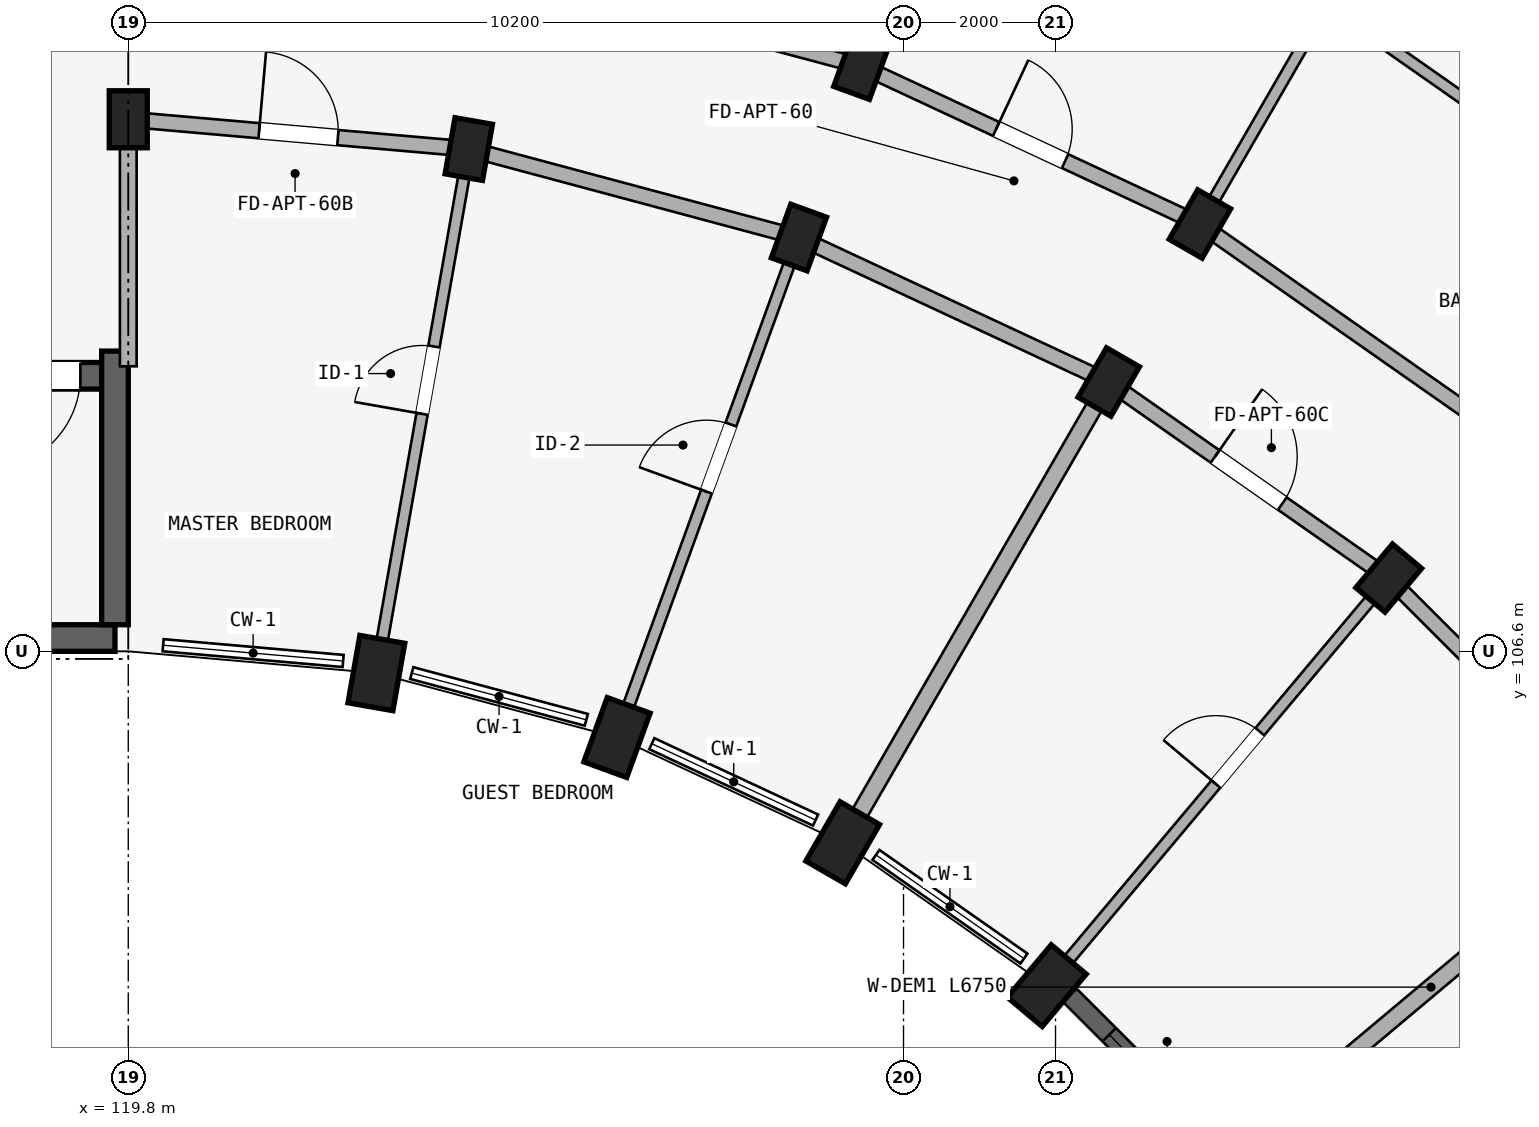
"""IFC4 building model, lengths in metres.
Left out: names, types, materials, properties, quantities, classifications, styles, units other than length and angle.
Written with IfcOpenShell. Run it as: python <this file> out.ifc"""

import sys

from ifc_helpers import new_model, si_unit, direction, frame, frame_2d, origin, origin_2d, place, context, subcontext, project, spatial, rectangle, extrude, element, fill, save


model = new_model("IFC4")
c1 = context("Model", 3, precision=1e-05, world=origin(), true_north=direction((0.0, 1.0)))
c2 = subcontext(c1, "Body", "Model", "MODEL_VIEW")
j1 = project(units=[si_unit("LENGTHUNIT", "METRE"), si_unit("PLANEANGLEUNIT", "RADIAN")], contexts=[c1])
p1 = place(None, origin())
s1 = spatial("IfcSite", under=j1, at=p1, CompositionType="ELEMENT")
p2 = place(p1, origin())
s2 = spatial("IfcBuilding", under=s1, at=p2, CompositionType="ELEMENT")
p3 = place(p2, frame((0.0, 0.0, 4.5)))
s3 = spatial("IfcBuildingStorey", under=s2, at=p3, CompositionType="ELEMENT", Elevation=4.5)
p4 = place(p3, frame((119.625, 106.775, 0.0), z_axis=(0.0, 0.0, 1.0), x_axis=(-1.0, 0.0, 0.0)))
e1 = element("IfcWall", 1, at=p4, inside=s3, PredefinedType="SHEAR", context=c2, shape_type="SweptSolid", body=[
    extrude(rectangle(XDim=8.25, YDim=0.35, at=frame_2d((4.125, 0.0))), origin(), (0.0, 0.0, 1.0), 3.98),
])
p5 = place(p3, frame((119.45, 110.225, 0.0), z_axis=(0.0, 0.0, 1.0), x_axis=(-1.0, 0.0, 0.0)))
e2 = element("IfcWall", 2, at=p5, inside=s3, PredefinedType="SHEAR", context=c2, shape_type="SweptSolid", body=[
    extrude(rectangle(XDim=7.9, YDim=0.35, at=frame_2d((3.95, 0.0))), origin(), (0.0, 0.0, 1.0), 3.98),
])
p6 = place(p5, frame((0.28, 0.0, 0.0)))
e3 = element("IfcOpeningElement", 3, at=p6, cuts=e2, PredefinedType="OPENING", context=c2, shape_type="SweptSolid", body=[
    extrude(rectangle(XDim=1.24, YDim=2.15, at=frame_2d((0.62, 1.075))), frame((0.0, 0.185, 0.0), z_axis=(0.0, -1.0, 0.0), x_axis=(1.0, 0.0, 0.0)), (0.0, 0.0, 1.0), 0.37),
])
p7 = place(p3, frame((119.625, 106.95, 0.0), z_axis=(0.0, 0.0, 1.0), x_axis=(0.0, 1.0, 0.0)))
e4 = element("IfcWall", 4, at=p7, inside=s3, PredefinedType="SHEAR", context=c2, shape_type="SweptSolid", body=[
    extrude(rectangle(XDim=3.6, YDim=0.35, at=frame_2d((1.8, 0.0))), origin(), (0.0, 0.0, 1.0), 3.98),
])
p8 = place(p3, frame((119.8, 113.6, 0.0), z_axis=(0.0, 0.0, 1.0), x_axis=(1.0, 0.0, 0.0)))
e5 = element("IfcColumn", 5, at=p8, inside=s3, PredefinedType="COLUMN", context=c2, shape_type="SweptSolid", body=[
    extrude(rectangle(XDim=0.5, YDim=0.75, at=origin_2d()), origin(), (0.0, 0.0, 1.0), 3.98),
])
p9 = place(p3, frame((123.065, 106.314, 0.0), z_axis=(0.0, 0.0, 1.0), x_axis=(-0.984807753012, 0.173648177667, 0.0)))
e6 = element("IfcColumn", 6, at=p9, inside=s3, PredefinedType="COLUMN", context=c2, shape_type="SweptSolid", body=[
    extrude(rectangle(XDim=0.6, YDim=0.9, at=origin_2d()), origin(), (0.0, 0.0, 1.0), 3.98),
])
p10 = place(p3, frame((124.28, 113.208, 0.0), z_axis=(0.0, 0.0, 1.0), x_axis=(-0.984807753012, 0.173648177667, 0.0)))
e7 = element("IfcColumn", 7, at=p10, inside=s3, PredefinedType="COLUMN", context=c2, shape_type="SweptSolid", body=[
    extrude(rectangle(XDim=0.5, YDim=0.75, at=origin_2d()), origin(), (0.0, 0.0, 1.0), 3.98),
])
p11 = place(p3, frame((126.23, 105.466, 0.0), z_axis=(0.0, 0.0, 1.0), x_axis=(-0.939692620786, 0.342020143326, 0.0)))
e8 = element("IfcColumn", 8, at=p11, inside=s3, PredefinedType="COLUMN", context=c2, shape_type="SweptSolid", body=[
    extrude(rectangle(XDim=0.6, YDim=0.9, at=origin_2d()), origin(), (0.0, 0.0, 1.0), 3.98),
])
for number, where, z_axis, x_axis in (
    (9, (128.624, 112.044, 0.0), (0.0, 0.0, 1.0), (-0.94, 0.342, 0.0)),
    (10, (129.445, 114.299, 0.0), (0.0, 0.0, 1.0), (-0.94, 0.342, 0.0)),
):
    element("IfcColumn", number, at=place(p3, frame(where, z_axis=z_axis, x_axis=x_axis)), inside=s3, PredefinedType="COLUMN", context=c2, shape_type="SweptSolid", body=[
        extrude(rectangle(XDim=0.5, YDim=0.75, at=origin_2d()), origin(), (0.0, 0.0, 1.0), 3.98),
    ])
p12 = place(p3, frame((129.2, 104.081, 0.0), z_axis=(0.0, 0.0, 1.0), x_axis=(-0.866025403784, 0.5, 0.0)))
e11 = element("IfcColumn", 11, at=p12, inside=s3, PredefinedType="COLUMN", context=c2, shape_type="SweptSolid", body=[
    extrude(rectangle(XDim=0.6, YDim=0.9, at=origin_2d()), origin(), (0.0, 0.0, 1.0), 3.98),
])
for number, where, z_axis, x_axis in (
    (12, (132.7, 110.144, 0.0), (0.0, 0.0, 1.0), (-0.866, 0.5, 0.0)),
    (13, (133.9, 112.222, 0.0), (0.0, 0.0, 1.0), (-0.866, 0.5, 0.0)),
):
    element("IfcColumn", number, at=place(p3, frame(where, z_axis=z_axis, x_axis=x_axis)), inside=s3, PredefinedType="COLUMN", context=c2, shape_type="SweptSolid", body=[
        extrude(rectangle(XDim=0.5, YDim=0.75, at=origin_2d()), origin(), (0.0, 0.0, 1.0), 3.98),
    ])
p13 = place(p3, frame((131.885, 102.202, 0.0), z_axis=(0.0, 0.0, 1.0), x_axis=(-0.766044443119, 0.642787609687, 0.0)))
e14 = element("IfcColumn", 14, at=p13, inside=s3, PredefinedType="COLUMN", context=c2, shape_type="SweptSolid", body=[
    extrude(rectangle(XDim=0.6, YDim=0.9, at=origin_2d()), origin(), (0.0, 0.0, 1.0), 3.98),
])
p14 = place(p3, frame((136.384, 107.564, 0.0), z_axis=(0.0, 0.0, 1.0), x_axis=(-0.766044443119, 0.642787609687, 0.0)))
e15 = element("IfcColumn", 15, at=p14, inside=s3, PredefinedType="COLUMN", context=c2, shape_type="SweptSolid", body=[
    extrude(rectangle(XDim=0.5, YDim=0.75, at=origin_2d()), origin(), (0.0, 0.0, 1.0), 3.98),
])
p15 = place(p3, frame((119.8, 113.6, 0.0), z_axis=(0.0, 0.0, 1.0), x_axis=(0.996191949488, -0.087187153726, 0.0)))
e16 = element("IfcWall", 16, at=p15, inside=s3, PredefinedType="STANDARD", context=c2, shape_type="SweptSolid", body=[
    extrude(rectangle(XDim=4.497, YDim=0.2, at=frame_2d((2.249, 0.0))), origin(), (0.0, 0.0, 1.0), 3.322),
])
p16 = place(p15, frame((1.729, 0.0, 0.0)))
e17 = element("IfcOpeningElement", 17, at=p16, cuts=e16, PredefinedType="OPENING", context=c2, shape_type="SweptSolid", body=[
    extrude(rectangle(XDim=1.04, YDim=2.15, at=frame_2d((0.52, 1.075))), frame((0.0, 0.11, 0.0), z_axis=(0.0, -1.0, 0.0), x_axis=(1.0, 0.0, 0.0)), (0.0, 0.0, 1.0), 0.22),
])
p17 = place(p3, frame((124.28, 113.208, 0.0), z_axis=(0.0, 0.0, 1.0), x_axis=(0.965934240054, -0.258787642463, 0.0)))
e18 = element("IfcWall", 18, at=p17, inside=s3, PredefinedType="STANDARD", context=c2, shape_type="SweptSolid", body=[
    extrude(rectangle(XDim=4.497, YDim=0.2, at=frame_2d((2.249, 0.0))), origin(), (0.0, 0.0, 1.0), 3.322),
])
p18 = place(p3, frame((124.697, 115.572, 0.0), z_axis=(0.0, 0.0, 1.0), x_axis=(0.965930095386, -0.258803112091, 0.0)))
e19 = element("IfcWall", 19, at=p18, inside=s3, PredefinedType="STANDARD", context=c2, shape_type="SweptSolid", body=[
    extrude(rectangle(XDim=4.916, YDim=0.2, at=frame_2d((2.458, 0.0))), origin(), (0.0, 0.0, 1.0), 3.322),
])
p19 = place(p3, frame((128.624, 112.044, 0.0), z_axis=(0.0, 0.0, 1.0), x_axis=(0.906307919131, -0.422617978463, 0.0)))
e20 = element("IfcWall", 20, at=p19, inside=s3, PredefinedType="STANDARD", context=c2, shape_type="SweptSolid", body=[
    extrude(rectangle(XDim=4.497, YDim=0.2, at=frame_2d((2.249, 0.0))), origin(), (0.0, 0.0, 1.0), 3.322),
])
p20 = place(p3, frame((129.445, 114.299, 0.0), z_axis=(0.0, 0.0, 1.0), x_axis=(0.906302381024, -0.422629854778, 0.0)))
e21 = element("IfcWall", 21, at=p20, inside=s3, PredefinedType="STANDARD", context=c2, shape_type="SweptSolid", body=[
    extrude(rectangle(XDim=4.915, YDim=0.2, at=frame_2d((2.458, 0.0))), origin(), (0.0, 0.0, 1.0), 3.322),
])
p21 = place(p20, frame((1.958, 0.0, 0.0)))
e22 = element("IfcOpeningElement", 22, at=p21, cuts=e21, PredefinedType="OPENING", context=c2, shape_type="SweptSolid", body=[
    extrude(rectangle(XDim=1.0, YDim=2.15, at=frame_2d((0.5, 1.075))), frame((0.0, 0.11, 0.0), z_axis=(0.0, -1.0, 0.0), x_axis=(1.0, 0.0, 0.0)), (0.0, 0.0, 1.0), 0.22),
])
p22 = place(p3, frame((132.7, 110.144, 0.0), z_axis=(0.0, 0.0, 1.0), x_axis=(0.819155404658, -0.573571637217, 0.0)))
e23 = element("IfcWall", 23, at=p22, inside=s3, PredefinedType="STANDARD", context=c2, shape_type="SweptSolid", body=[
    extrude(rectangle(XDim=4.497, YDim=0.2, at=frame_2d((2.249, 0.0))), origin(), (0.0, 0.0, 1.0), 3.322),
])
p23 = place(p22, frame((1.709, 0.0, 0.0)))
e24 = element("IfcOpeningElement", 24, at=p23, cuts=e23, PredefinedType="OPENING", context=c2, shape_type="SweptSolid", body=[
    extrude(rectangle(XDim=1.08, YDim=2.15, at=frame_2d((0.54, 1.075))), frame((0.0, 0.11, 0.0), z_axis=(0.0, -1.0, 0.0), x_axis=(1.0, 0.0, 0.0)), (0.0, 0.0, 1.0), 0.22),
])
p24 = place(p3, frame((133.9, 112.222, 0.0), z_axis=(0.0, 0.0, 1.0), x_axis=(0.819140911474, -0.573592335331, 0.0)))
e25 = element("IfcWall", 25, at=p24, inside=s3, PredefinedType="STANDARD", context=c2, shape_type="SweptSolid", body=[
    extrude(rectangle(XDim=4.916, YDim=0.2, at=frame_2d((2.458, 0.0))), origin(), (0.0, 0.0, 1.0), 3.322),
])
p25 = place(p3, frame((136.384, 107.564, 0.0), z_axis=(0.0, 0.0, 1.0), x_axis=(0.707106781187, -0.707106781187, 0.0)))
e26 = element("IfcWall", 26, at=p25, inside=s3, PredefinedType="STANDARD", context=c2, shape_type="SweptSolid", body=[
    extrude(rectangle(XDim=4.497, YDim=0.2, at=frame_2d((2.249, 0.0))), origin(), (0.0, 0.0, 1.0), 3.322),
])
p26 = place(p3, frame((119.8, 110.35, 0.0), z_axis=(0.0, 0.0, 1.0), x_axis=(0.0, 1.0, 0.0)))
e27 = element("IfcWall", 27, at=p26, inside=s3, PredefinedType="STANDARD", context=c2, shape_type="SweptSolid", body=[
    extrude(rectangle(XDim=3.2, YDim=0.22, at=frame_2d((1.6, 0.0))), origin(), (0.0, 0.0, 1.0), 3.322),
])
p27 = place(p3, frame((123.099, 106.511, 0.0), z_axis=(0.0, 0.0, 1.0), x_axis=(0.173647089161, 0.984807944945, 0.0)))
e28 = element("IfcWall", 28, at=p27, inside=s3, PredefinedType="PARTITIONING", context=c2, shape_type="SweptSolid", body=[
    extrude(rectangle(XDim=6.75, YDim=0.15, at=frame_2d((3.375, 0.0))), origin(), (0.0, 0.0, 1.0), 3.322),
])
p28 = place(p27, frame((3.262, 0.0, 0.0)))
e29 = element("IfcOpeningElement", 29, at=p28, cuts=e28, PredefinedType="OPENING", context=c2, shape_type="SweptSolid", body=[
    extrude(rectangle(XDim=0.9, YDim=2.1, at=frame_2d((0.45, 1.05))), frame((0.0, 0.085, 0.0), z_axis=(0.0, -1.0, 0.0), x_axis=(1.0, 0.0, 0.0)), (0.0, 0.0, 1.0), 0.17),
])
p29 = place(p3, frame((126.298, 105.654, 0.0), z_axis=(0.0, 0.0, 1.0), x_axis=(0.342010221662, 0.939696231917, 0.0)))
e30 = element("IfcWall", 30, at=p29, inside=s3, PredefinedType="PARTITIONING", context=c2, shape_type="SweptSolid", body=[
    extrude(rectangle(XDim=6.75, YDim=0.15, at=frame_2d((3.375, 0.0))), origin(), (0.0, 0.0, 1.0), 3.322),
])
p30 = place(p29, frame((3.242, 0.0, 0.0)))
e31 = element("IfcOpeningElement", 31, at=p30, cuts=e30, PredefinedType="OPENING", context=c2, shape_type="SweptSolid", body=[
    extrude(rectangle(XDim=0.94, YDim=2.1, at=frame_2d((0.47, 1.05))), frame((0.0, 0.085, 0.0), z_axis=(0.0, -1.0, 0.0), x_axis=(1.0, 0.0, 0.0)), (0.0, 0.0, 1.0), 0.17),
])
p31 = place(p3, frame((129.479, 114.393, 0.0), z_axis=(0.0, 0.0, 1.0), x_axis=(0.342022120477, 0.939691901159, 0.0)))
e32 = element("IfcWall", 32, at=p31, inside=s3, PredefinedType="STANDARD", context=c2, shape_type="SweptSolid", body=[
    extrude(rectangle(XDim=17.42, YDim=0.23, at=frame_2d((8.71, 0.0))), origin(), (0.0, 0.0, 1.0), 3.322),
])
p32 = place(p3, frame((129.3, 104.254, 0.0), z_axis=(0.0, 0.0, 1.0), x_axis=(0.499997969693, 0.866026575979, 0.0)))
e33 = element("IfcWall", 33, at=p32, inside=s3, PredefinedType="STANDARD", context=c2, shape_type="SweptSolid", body=[
    extrude(rectangle(XDim=6.75, YDim=0.22, at=frame_2d((3.375, 0.0))), origin(), (0.0, 0.0, 1.0), 3.322),
])
p33 = place(p3, frame((133.95, 112.309, 0.0), z_axis=(0.0, 0.0, 1.0), x_axis=(0.499997843263, 0.866026648973, 0.0)))
e34 = element("IfcWall", 34, at=p33, inside=s3, PredefinedType="PARTITIONING", context=c2, shape_type="SweptSolid", body=[
    extrude(rectangle(XDim=17.42, YDim=0.15, at=frame_2d((8.71, 0.0))), origin(), (0.0, 0.0, 1.0), 3.322),
])
p34 = place(p33, frame((7.5, 0.0, 0.0)))
e35 = element("IfcOpeningElement", 35, at=p34, cuts=e34, PredefinedType="OPENING", context=c2, shape_type="SweptSolid", body=[
    extrude(rectangle(XDim=0.8, YDim=2.1, at=frame_2d((0.4, 1.05))), frame((0.0, 0.085, 0.0), z_axis=(0.0, -1.0, 0.0), x_axis=(1.0, 0.0, 0.0)), (0.0, 0.0, 1.0), 0.17),
])
p35 = place(p3, frame((132.013, 102.355, 0.0), z_axis=(0.0, 0.0, 1.0), x_axis=(0.642784846501, 0.766046761698, 0.0)))
e36 = element("IfcWall", 36, at=p35, inside=s3, PredefinedType="PARTITIONING", context=c2, shape_type="SweptSolid", body=[
    extrude(rectangle(XDim=6.75, YDim=0.15, at=frame_2d((3.375, 0.0))), origin(), (0.0, 0.0, 1.0), 3.322),
])
p36 = place(p35, frame((3.262, 0.0, 0.0)))
e37 = element("IfcOpeningElement", 37, at=p36, cuts=e36, PredefinedType="OPENING", context=c2, shape_type="SweptSolid", body=[
    extrude(rectangle(XDim=0.9, YDim=2.1, at=frame_2d((0.45, 1.05))), frame((0.0, 0.085, 0.0), z_axis=(0.0, -1.0, 0.0), x_axis=(1.0, 0.0, 0.0)), (0.0, 0.0, 1.0), 0.17),
])
p37 = place(p3, frame((134.355, 100.013, 0.0), z_axis=(0.0, 0.0, 1.0), x_axis=(0.766046761698, 0.642784846501, 0.0)))
e38 = element("IfcWall", 38, at=p37, inside=s3, PredefinedType="STANDARD", context=c2, shape_type="SweptSolid", body=[
    extrude(rectangle(XDim=6.75, YDim=0.22, at=frame_2d((3.375, 0.0))), origin(), (0.0, 0.0, 1.0), 3.322),
])
p38 = place(p3, frame((135.575, 115.123, 0.0), z_axis=(0.0, 0.0, 1.0), x_axis=(0.819156831143, -0.573569599955, 0.0)))
e39 = element("IfcWall", 39, at=p38, inside=s3, PredefinedType="PLUMBINGWALL", context=c2, shape_type="SweptSolid", body=[
    extrude(rectangle(XDim=5.5, YDim=0.15, at=frame_2d((2.75, 0.0))), origin(), (0.0, 0.0, 1.0), 3.322),
])
p39 = place(p38, frame((2.33, 0.0, 0.0)))
e40 = element("IfcOpeningElement", 40, at=p39, cuts=e39, PredefinedType="OPENING", context=c2, shape_type="SweptSolid", body=[
    extrude(rectangle(XDim=0.84, YDim=2.1, at=frame_2d((0.42, 1.05))), frame((0.0, 0.085, 0.0), z_axis=(0.0, -1.0, 0.0), x_axis=(1.0, 0.0, 0.0)), (0.0, 0.0, 1.0), 0.17),
])
p40 = place(p3, frame((132.188, 102.075, 0.0), z_axis=(0.0, 0.0, 1.0), x_axis=(0.707106781187, -0.707106781187, 0.0)))
e41 = element("IfcWall", 41, at=p40, inside=s3, PredefinedType="STANDARD", context=c2, shape_type="SweptSolid", body=[
    extrude(rectangle(XDim=2.67, YDim=0.25, at=frame_2d((1.335, 0.0))), origin(), (0.0, 0.0, 1.0), 3.472),
])
p41 = place(p40, frame((0.735, 0.0, 0.88)))
e42 = element("IfcOpeningElement", 42, at=p41, cuts=e41, PredefinedType="OPENING", context=c2, shape_type="SweptSolid", body=[
    extrude(rectangle(XDim=1.2, YDim=1.5, at=frame_2d((0.6, 0.75))), frame((0.0, 0.135, 0.0), z_axis=(0.0, -1.0, 0.0), x_axis=(1.0, 0.0, 0.0)), (0.0, 0.0, 1.0), 0.27),
])
p42 = place(p41, origin())
e43 = element("IfcWindow", 43, at=p42, inside=s3, PartitioningType="SINGLE_PANEL", PredefinedType="WINDOW", context=c2, shape_type="SweptSolid", body=[
    extrude(rectangle(XDim=1.2, YDim=1.5, at=frame_2d((0.6, 0.75))), frame((0.0, 0.03, 0.0), z_axis=(0.0, -1.0, 0.0), x_axis=(1.0, 0.0, 0.0)), (0.0, 0.0, 1.0), 0.06),
])
fill(e42, e43)
p43 = place(p6, origin())
e44 = element("IfcDoor", 44, at=p43, inside=s3, OperationType="SINGLE_SWING_RIGHT", PredefinedType="DOOR", context=c2, shape_type="SweptSolid", body=[
    extrude(rectangle(XDim=1.24, YDim=2.15, at=frame_2d((0.62, 1.075))), frame((0.0, 0.025, 0.0), z_axis=(0.0, -1.0, 0.0), x_axis=(1.0, 0.0, 0.0)), (0.0, 0.0, 1.0), 0.05),
])
fill(e3, e44)
p44 = place(p28, frame((0.9, 0.0, 0.0), z_axis=(0.0, 0.0, 1.0), x_axis=(-1.0, 0.0, 0.0)))
e45 = element("IfcDoor", 45, at=p44, inside=s3, OperationType="SINGLE_SWING_RIGHT", PredefinedType="DOOR", context=c2, shape_type="SweptSolid", body=[
    extrude(rectangle(XDim=0.9, YDim=2.1, at=frame_2d((0.45, 1.05))), frame((0.0, 0.025, 0.0), z_axis=(0.0, -1.0, 0.0), x_axis=(1.0, 0.0, 0.0)), (0.0, 0.0, 1.0), 0.05),
])
fill(e29, e45)
p45 = place(p30, frame((0.94, 0.0, 0.0), z_axis=(0.0, 0.0, 1.0), x_axis=(-1.0, 0.0, 0.0)))
e46 = element("IfcDoor", 46, at=p45, inside=s3, OperationType="SINGLE_SWING_RIGHT", PredefinedType="DOOR", context=c2, shape_type="SweptSolid", body=[
    extrude(rectangle(XDim=0.94, YDim=2.1, at=frame_2d((0.47, 1.05))), frame((0.0, 0.025, 0.0), z_axis=(0.0, -1.0, 0.0), x_axis=(1.0, 0.0, 0.0)), (0.0, 0.0, 1.0), 0.05),
])
fill(e31, e46)
p46 = place(p36, frame((0.9, 0.0, 0.0), z_axis=(0.0, 0.0, 1.0), x_axis=(-1.0, 0.0, 0.0)))
e47 = element("IfcDoor", 47, at=p46, inside=s3, OperationType="SINGLE_SWING_RIGHT", PredefinedType="DOOR", context=c2, shape_type="SweptSolid", body=[
    extrude(rectangle(XDim=0.9, YDim=2.1, at=frame_2d((0.45, 1.05))), frame((0.0, 0.025, 0.0), z_axis=(0.0, -1.0, 0.0), x_axis=(1.0, 0.0, 0.0)), (0.0, 0.0, 1.0), 0.05),
])
fill(e37, e47)
p47 = place(p21, origin())
e48 = element("IfcDoor", 48, at=p47, inside=s3, OperationType="SINGLE_SWING_LEFT", PredefinedType="DOOR", context=c2, shape_type="SweptSolid", body=[
    extrude(rectangle(XDim=1.0, YDim=2.15, at=frame_2d((0.5, 1.075))), frame((0.0, 0.025, 0.0), z_axis=(0.0, -1.0, 0.0), x_axis=(1.0, 0.0, 0.0)), (0.0, 0.0, 1.0), 0.05),
])
fill(e22, e48)
p48 = place(p16, origin())
e49 = element("IfcDoor", 49, at=p48, inside=s3, OperationType="SINGLE_SWING_LEFT", PredefinedType="DOOR", context=c2, shape_type="SweptSolid", body=[
    extrude(rectangle(XDim=1.04, YDim=2.15, at=frame_2d((0.52, 1.075))), frame((0.0, 0.025, 0.0), z_axis=(0.0, -1.0, 0.0), x_axis=(1.0, 0.0, 0.0)), (0.0, 0.0, 1.0), 0.05),
])
fill(e17, e49)
p49 = place(p23, frame((1.08, 0.0, 0.0), z_axis=(0.0, 0.0, 1.0), x_axis=(-1.0, 0.0, 0.0)))
e50 = element("IfcDoor", 50, at=p49, inside=s3, OperationType="SINGLE_SWING_RIGHT", PredefinedType="DOOR", context=c2, shape_type="SweptSolid", body=[
    extrude(rectangle(XDim=1.08, YDim=2.15, at=frame_2d((0.54, 1.075))), frame((0.0, 0.025, 0.0), z_axis=(0.0, -1.0, 0.0), x_axis=(1.0, 0.0, 0.0)), (0.0, 0.0, 1.0), 0.05),
])
fill(e24, e50)
save(model, sys.argv[1])
